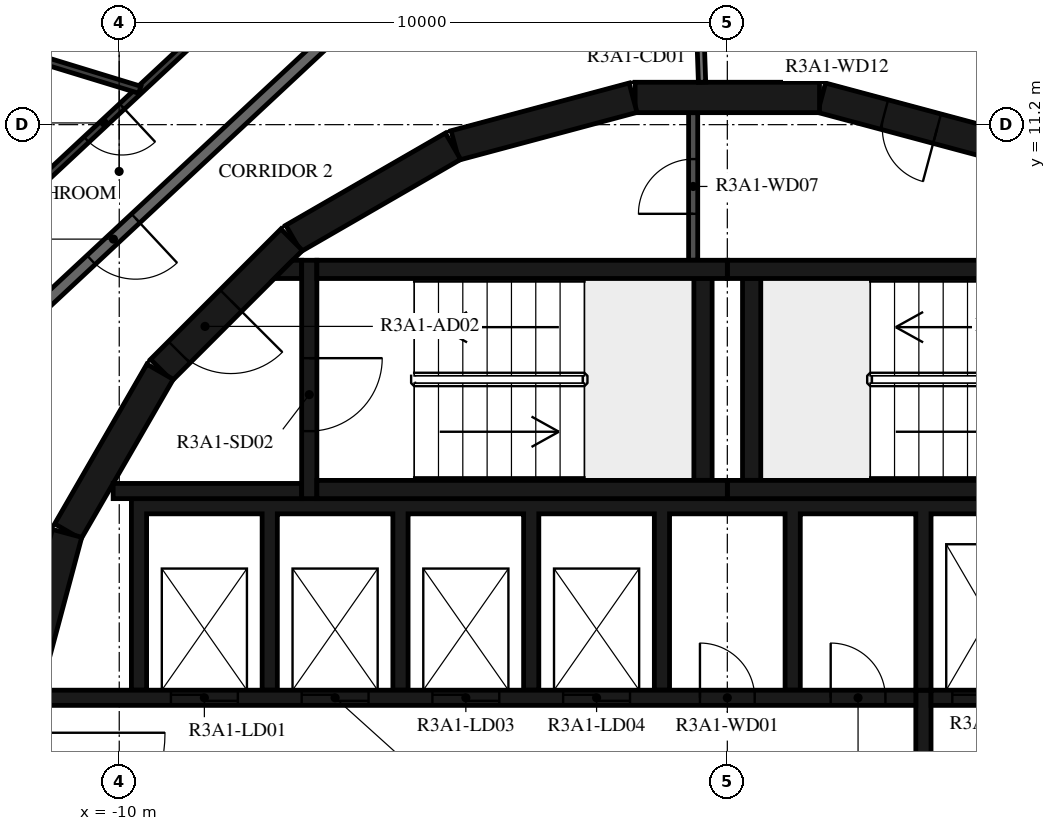
"""IFC4 building model, lengths in metres.
Left out: names, types, materials, properties, quantities, classifications, styles, units other than length and angle.
Written with IfcOpenShell. Run it as: python <this file> out.ifc"""

import sys

from ifc_helpers import new_model, si_unit, direction, frame, frame_2d, origin, place, context, subcontext, project, spatial, polyline, rectangle, outline, extrude, element, fill, save


model = new_model("IFC4")
c1 = context("Model", 3, precision=1e-05, world=origin(), true_north=direction((0.0, 1.0)))
c2 = subcontext(c1, "Body", "Model", "MODEL_VIEW")
j1 = project(units=[si_unit("LENGTHUNIT", "METRE"), si_unit("PLANEANGLEUNIT", "RADIAN")], contexts=[c1])
p1 = place(None, origin())
s1 = spatial("IfcSite", under=j1, at=p1, CompositionType="ELEMENT")
p2 = place(p1, origin())
s2 = spatial("IfcBuilding", under=s1, at=p2, CompositionType="ELEMENT")
p3 = place(p2, frame((0.0, 0.0, 116.9)))
s3 = spatial("IfcBuildingStorey", under=s2, at=p3, CompositionType="ELEMENT", Elevation=116.9)
p4 = place(p3, frame((4.479, 10.858, 0.0), z_axis=(0.0, 0.0, 1.0), x_axis=(-0.965948410781, 0.258734743916, 0.0)))
e1 = element("IfcWall", 1, at=p4, inside=s3, PredefinedType="SHEAR", context=c2, shape_type="SweptSolid", body=[
    extrude(rectangle(XDim=3.033, YDim=0.5, at=frame_2d((1.516, 0.0))), origin(), (0.0, 0.0, 1.0), 3.12),
])
p5 = place(p4, frame((1.066, 0.0, 0.0)))
e2 = element("IfcOpeningElement", 2, at=p5, cuts=e1, PredefinedType="OPENING", context=c2, shape_type="SweptSolid", body=[
    extrude(rectangle(XDim=0.9, YDim=2.1, at=frame_2d((0.45, 1.05))), frame((0.0, 0.26, 0.0), z_axis=(0.0, -1.0, 0.0), x_axis=(1.0, 0.0, 0.0)), (0.0, 0.0, 1.0), 0.52),
])
for number, where, z_axis, x_axis in (
    (3, (1.516, 11.647, 0.0), (0.0, 0.0, 1.0), (-1.0, 0.0, 0.0)),
    (4, (-1.55, 11.643, 0.0), (0.0, 0.0, 1.0), (-0.966, -0.259, 0.0)),
    (5, (-4.51, 10.845, 0.0), (0.0, 0.0, 1.0), (-0.866, -0.5, 0.0)),
):
    element("IfcWall", number, at=place(p3, frame(where, z_axis=z_axis, x_axis=x_axis)), inside=s3, PredefinedType="SHEAR", context=c2, shape_type="SweptSolid", body=[
        extrude(rectangle(XDim=3.033, YDim=0.5, at=frame_2d((1.516, 0.0))), origin(), (0.0, 0.0, 1.0), 3.12),
    ])
p6 = place(p3, frame((-7.164, 9.308, 0.0), z_axis=(0.0, 0.0, 1.0), x_axis=(-0.707106781187, -0.707106781187, 0.0)))
e6 = element("IfcWall", 6, at=p6, inside=s3, PredefinedType="SHEAR", context=c2, shape_type="SweptSolid", body=[
    extrude(rectangle(XDim=3.032, YDim=0.5, at=frame_2d((1.516, 0.0))), origin(), (0.0, 0.0, 1.0), 3.12),
])
p7 = place(p6, frame((1.416, 0.0, 0.0)))
e7 = element("IfcOpeningElement", 7, at=p7, cuts=e6, PredefinedType="OPENING", context=c2, shape_type="SweptSolid", body=[
    extrude(rectangle(XDim=1.2, YDim=2.1, at=frame_2d((0.6, 1.05))), frame((0.0, 0.26, 0.0), z_axis=(0.0, -1.0, 0.0), x_axis=(1.0, 0.0, 0.0)), (0.0, 0.0, 1.0), 0.52),
])
for number, where, z_axis, x_axis in (
    (8, (-9.329, 7.137, 0.0), (0.0, 0.0, 1.0), (-0.5, -0.866, 0.0)),
    (9, (-10.858, 4.479, 0.0), (0.0, 0.0, 1.0), (-0.259, -0.966, 0.0)),
):
    element("IfcWall", number, at=place(p3, frame(where, z_axis=z_axis, x_axis=x_axis)), inside=s3, PredefinedType="SHEAR", context=c2, shape_type="SweptSolid", body=[
        extrude(rectangle(XDim=3.033, YDim=0.5, at=frame_2d((1.516, 0.0))), origin(), (0.0, 0.0, 1.0), 3.12),
    ])
for number, where, z_axis, x_axis in (
    (10, (0.0, 5.2, 0.0), (0.0, 0.0, 1.0), (1.0, 0.0, 0.0)),
    (11, (0.0, 8.82, 0.0), (0.0, 0.0, 1.0), (1.0, 0.0, 0.0)),
):
    element("IfcWall", number, at=place(p3, frame(where, z_axis=z_axis, x_axis=x_axis)), inside=s3, PredefinedType="SHEAR", context=c2, shape_type="SweptSolid", body=[
        extrude(rectangle(XDim=6.75, YDim=0.3, at=frame_2d((3.375, 0.0))), origin(), (0.0, 0.0, 1.0), 3.12),
    ])
p8 = place(p3, frame((0.4, 5.35, 0.0), z_axis=(0.0, 0.0, 1.0), x_axis=(0.0, 1.0, 0.0)))
e12 = element("IfcWall", 12, at=p8, inside=s3, PredefinedType="SHEAR", context=c2, shape_type="SweptSolid", body=[
    extrude(rectangle(XDim=3.32, YDim=0.3, at=frame_2d((1.66, 0.0))), origin(), (0.0, 0.0, 1.0), 3.12),
])
for number, where, z_axis, x_axis in (
    (13, (-6.75, 5.2, 0.0), (0.0, 0.0, 1.0), (1.0, 0.0, 0.0)),
    (14, (-6.75, 8.82, 0.0), (0.0, 0.0, 1.0), (1.0, 0.0, 0.0)),
):
    element("IfcWall", number, at=place(p3, frame(where, z_axis=z_axis, x_axis=x_axis)), inside=s3, PredefinedType="SHEAR", context=c2, shape_type="SweptSolid", body=[
        extrude(rectangle(XDim=6.75, YDim=0.3, at=frame_2d((3.375, 0.0))), origin(), (0.0, 0.0, 1.0), 3.12),
    ])
p9 = place(p3, frame((-0.4, 5.35, 0.0), z_axis=(0.0, 0.0, 1.0), x_axis=(0.0, 1.0, 0.0)))
e15 = element("IfcWall", 15, at=p9, inside=s3, PredefinedType="SHEAR", context=c2, shape_type="SweptSolid", body=[
    extrude(rectangle(XDim=3.32, YDim=0.3, at=frame_2d((1.66, 0.0))), origin(), (0.0, 0.0, 1.0), 3.12),
])
p10 = place(p3, frame((-6.875, 8.97, 0.0), z_axis=(0.0, 0.0, 1.0), x_axis=(0.0, -1.0, 0.0)))
e16 = element("IfcWall", 16, at=p10, inside=s3, PredefinedType="SHEAR", context=c2, shape_type="SweptSolid", body=[
    extrude(rectangle(XDim=3.92, YDim=0.25, at=frame_2d((1.96, 0.0))), origin(), (0.0, 0.0, 1.0), 3.12),
])
p11 = place(p10, frame((1.61, 0.0, 0.0)))
e17 = element("IfcOpeningElement", 17, at=p11, cuts=e16, PredefinedType="OPENING", context=c2, shape_type="SweptSolid", body=[
    extrude(rectangle(XDim=1.2, YDim=2.1, at=frame_2d((0.6, 1.05))), frame((0.0, 0.135, 0.0), z_axis=(0.0, -1.0, 0.0), x_axis=(1.0, 0.0, 0.0)), (0.0, 0.0, 1.0), 0.27),
])
p12 = place(p3, frame((-7.0, 5.175, 0.0), z_axis=(0.0, 0.0, 1.0), x_axis=(-1.0, 0.0, 0.0)))
e18 = element("IfcWall", 18, at=p12, inside=s3, PredefinedType="SHEAR", context=c2, shape_type="SweptSolid", body=[
    extrude(rectangle(XDim=3.1, YDim=0.25, at=frame_2d((1.55, 0.0))), origin(), (0.0, 0.0, 1.0), 3.12),
])
p13 = place(p3, origin())
e19 = element("IfcWall", 19, at=p13, inside=s3, PredefinedType="SHEAR", context=c2, shape_type="SweptSolid", body=[
    extrude(outline(polyline([(-7.148, 8.97), (-7.0, 8.97), (-7.0, 8.67), (-7.448, 8.67), (-7.148, 8.97)])), origin(), (0.0, 0.0, 1.0), 3.12),
])
p14 = place(p3, origin())
e20 = element("IfcWall", 20, at=p14, inside=s3, PredefinedType="SHEAR", context=c2, shape_type="SweptSolid", body=[
    extrude(outline(polyline([(-9.55, 4.8), (-7.65, 4.8), (-7.65, 1.9), (-7.4, 1.9), (-7.4, 4.8), (-5.5, 4.8), (-5.5, 1.9), (-5.25, 1.9), (-5.25, 4.8), (-3.35, 4.8), (-3.35, 1.9), (-3.1, 1.9), (-3.1, 4.8), (-1.2, 4.8), (-1.2, 1.9), (-0.95, 1.9), (-0.95, 4.8), (0.95, 4.8), (0.95, 1.9), (1.2, 1.9), (1.2, 4.8), (3.1, 4.8), (3.1, 1.9), (3.35, 1.9), (3.35, 4.8), (5.25, 4.8), (5.25, 1.9), (5.5, 1.9), (5.5, 4.8), (7.4, 4.8), (7.4, 1.9), (7.65, 1.9), (7.65, 4.8), (9.55, 4.8), (9.55, 1.9), (9.8, 1.9), (9.8, 4.8), (9.8, 5.05), (-9.8, 5.05), (-9.8, 4.8), (-9.8, 1.9), (-9.55, 1.9), (-9.55, 4.8)])), origin(), (0.0, 0.0, 1.0), 3.12),
])
p15 = place(p3, frame((-11.28, 1.775, 0.0), z_axis=(0.0, 0.0, 1.0), x_axis=(1.0, 0.0, 0.0)))
e21 = element("IfcWall", 21, at=p15, inside=s3, PredefinedType="SHEAR", context=c2, shape_type="SweptSolid", body=[
    extrude(rectangle(XDim=14.38, YDim=0.25, at=frame_2d((7.19, 0.0))), origin(), (0.0, 0.0, 1.0), 3.12),
])
p16 = place(p15, frame((2.13, 0.0, 0.0)))
e22 = element("IfcOpeningElement", 22, at=p16, cuts=e21, PredefinedType="OPENING", context=c2, shape_type="SweptSolid", body=[
    extrude(rectangle(XDim=1.1, YDim=2.1, at=frame_2d((0.55, 1.05))), frame((0.0, 0.135, 0.0), z_axis=(0.0, -1.0, 0.0), x_axis=(1.0, 0.0, 0.0)), (0.0, 0.0, 1.0), 0.27),
])
p17 = place(p15, frame((4.28, 0.0, 0.0)))
e23 = element("IfcOpeningElement", 23, at=p17, cuts=e21, PredefinedType="OPENING", context=c2, shape_type="SweptSolid", body=[
    extrude(rectangle(XDim=1.1, YDim=2.1, at=frame_2d((0.55, 1.05))), frame((0.0, 0.135, 0.0), z_axis=(0.0, -1.0, 0.0), x_axis=(1.0, 0.0, 0.0)), (0.0, 0.0, 1.0), 0.27),
])
p18 = place(p15, frame((6.43, 0.0, 0.0)))
e24 = element("IfcOpeningElement", 24, at=p18, cuts=e21, PredefinedType="OPENING", context=c2, shape_type="SweptSolid", body=[
    extrude(rectangle(XDim=1.1, YDim=2.1, at=frame_2d((0.55, 1.05))), frame((0.0, 0.135, 0.0), z_axis=(0.0, -1.0, 0.0), x_axis=(1.0, 0.0, 0.0)), (0.0, 0.0, 1.0), 0.27),
])
p19 = place(p15, frame((8.58, 0.0, 0.0)))
e25 = element("IfcOpeningElement", 25, at=p19, cuts=e21, PredefinedType="OPENING", context=c2, shape_type="SweptSolid", body=[
    extrude(rectangle(XDim=1.1, YDim=2.1, at=frame_2d((0.55, 1.05))), frame((0.0, 0.135, 0.0), z_axis=(0.0, -1.0, 0.0), x_axis=(1.0, 0.0, 0.0)), (0.0, 0.0, 1.0), 0.27),
])
p20 = place(p15, frame((10.83, 0.0, 0.0)))
e26 = element("IfcOpeningElement", 26, at=p20, cuts=e21, PredefinedType="OPENING", context=c2, shape_type="SweptSolid", body=[
    extrude(rectangle(XDim=0.9, YDim=2.1, at=frame_2d((0.45, 1.05))), frame((0.0, 0.135, 0.0), z_axis=(0.0, -1.0, 0.0), x_axis=(1.0, 0.0, 0.0)), (0.0, 0.0, 1.0), 0.27),
])
p21 = place(p15, frame((12.98, 0.0, 0.0)))
e27 = element("IfcOpeningElement", 27, at=p21, cuts=e21, PredefinedType="OPENING", context=c2, shape_type="SweptSolid", body=[
    extrude(rectangle(XDim=0.9, YDim=2.1, at=frame_2d((0.45, 1.05))), frame((0.0, 0.135, 0.0), z_axis=(0.0, -1.0, 0.0), x_axis=(1.0, 0.0, 0.0)), (0.0, 0.0, 1.0), 0.27),
])
p22 = place(p3, frame((3.35, 1.775, 0.0), z_axis=(0.0, 0.0, 1.0), x_axis=(1.0, 0.0, 0.0)))
e28 = element("IfcWall", 28, at=p22, inside=s3, PredefinedType="SHEAR", context=c2, shape_type="SweptSolid", body=[
    extrude(rectangle(XDim=7.93, YDim=0.25, at=frame_2d((3.965, 0.0))), origin(), (0.0, 0.0, 1.0), 3.12),
])
p23 = place(p22, frame((0.35, 0.0, 0.0)))
e29 = element("IfcOpeningElement", 29, at=p23, cuts=e28, PredefinedType="OPENING", context=c2, shape_type="SweptSolid", body=[
    extrude(rectangle(XDim=1.2, YDim=2.4, at=frame_2d((0.6, 1.2))), frame((0.0, 0.135, 0.0), z_axis=(0.0, -1.0, 0.0), x_axis=(1.0, 0.0, 0.0)), (0.0, 0.0, 1.0), 0.27),
])
p24 = place(p22, frame((2.5, 0.0, 0.0)))
e30 = element("IfcOpeningElement", 30, at=p24, cuts=e28, PredefinedType="OPENING", context=c2, shape_type="SweptSolid", body=[
    extrude(rectangle(XDim=1.2, YDim=2.4, at=frame_2d((0.6, 1.2))), frame((0.0, 0.135, 0.0), z_axis=(0.0, -1.0, 0.0), x_axis=(1.0, 0.0, 0.0)), (0.0, 0.0, 1.0), 0.27),
])
p25 = place(p22, frame((4.8, 0.0, 0.0)))
e31 = element("IfcOpeningElement", 31, at=p25, cuts=e28, PredefinedType="OPENING", context=c2, shape_type="SweptSolid", body=[
    extrude(rectangle(XDim=0.9, YDim=2.1, at=frame_2d((0.45, 1.05))), frame((0.0, 0.135, 0.0), z_axis=(0.0, -1.0, 0.0), x_axis=(1.0, 0.0, 0.0)), (0.0, 0.0, 1.0), 0.27),
])
p26 = place(p3, frame((3.225, -1.9, 0.0), z_axis=(0.0, 0.0, 1.0), x_axis=(0.0, 1.0, 0.0)))
e32 = element("IfcWall", 32, at=p26, inside=s3, PredefinedType="SHEAR", context=c2, shape_type="SweptSolid", body=[
    extrude(rectangle(XDim=3.8, YDim=0.25, at=frame_2d((1.9, 0.0))), origin(), (0.0, 0.0, 1.0), 3.12),
])
p27 = place(p3, frame((-0.562, 8.97, 0.0), z_axis=(0.0, 0.0, 1.0), x_axis=(0.0, 1.0, 0.0)))
e33 = element("IfcWall", 33, at=p27, inside=s3, PredefinedType="PARTITIONING", context=c2, shape_type="SweptSolid", body=[
    extrude(rectangle(XDim=2.427, YDim=0.15, at=frame_2d((1.214, 0.0))), origin(), (0.0, 0.0, 1.0), 3.12),
])
p28 = place(p27, frame((0.764, 0.0, 0.0)))
e34 = element("IfcOpeningElement", 34, at=p28, cuts=e33, PredefinedType="OPENING", context=c2, shape_type="SweptSolid", body=[
    extrude(rectangle(XDim=0.9, YDim=2.1, at=frame_2d((0.45, 1.05))), frame((0.0, 0.085, 0.0), z_axis=(0.0, -1.0, 0.0), x_axis=(1.0, 0.0, 0.0)), (0.0, 0.0, 1.0), 0.17),
])
p29 = place(p3, frame((-0.487, 13.948, 0.0), z_axis=(0.0, 0.0, 1.0), x_axis=(0.034859752231, -0.999392214135, 0.0)))
e35 = element("IfcWall", 35, at=p29, inside=s3, PredefinedType="PARTITIONING", context=c2, shape_type="SweptSolid", body=[
    extrude(rectangle(XDim=2.052, YDim=0.12, at=frame_2d((1.026, 0.0))), origin(), (0.0, 0.0, 1.0), 3.12),
])
p30 = place(p29, frame((0.125, 0.0, 0.0)))
e36 = element("IfcOpeningElement", 36, at=p30, cuts=e35, PredefinedType="OPENING", context=c2, shape_type="SweptSolid", body=[
    extrude(rectangle(XDim=1.2, YDim=2.1, at=frame_2d((0.6, 1.05))), frame((0.0, 0.07, 0.0), z_axis=(0.0, -1.0, 0.0), x_axis=(1.0, 0.0, 0.0)), (0.0, 0.0, 1.0), 0.14),
])
p31 = place(p3, frame((7.516, 12.028, 0.0), z_axis=(0.0, 0.0, 1.0), x_axis=(-0.956306642771, 0.292365533182, 0.0)))
e37 = element("IfcWall", 37, at=p31, inside=s3, PredefinedType="STANDARD", context=c2, shape_type="SweptSolid", body=[
    extrude(rectangle(XDim=7.342, YDim=0.2, at=frame_2d((3.671, 0.0))), origin(), (0.0, 0.0, 1.0), 3.12),
])
p32 = place(p3, frame((-6.659, 12.523, 0.0), z_axis=(0.0, 0.0, 1.0), x_axis=(-0.731350455479, -0.682001841105, 0.0)))
e38 = element("IfcWall", 38, at=p32, inside=s3, PredefinedType="STANDARD", context=c2, shape_type="SweptSolid", body=[
    extrude(rectangle(XDim=7.342, YDim=0.2, at=frame_2d((3.671, 0.0))), origin(), (0.0, 0.0, 1.0), 3.12),
])
p33 = place(p32, frame((4.2, 0.0, 0.0)))
e39 = element("IfcOpeningElement", 39, at=p33, cuts=e38, PredefinedType="OPENING", context=c2, shape_type="SweptSolid", body=[
    extrude(rectangle(XDim=1.0, YDim=2.1, at=frame_2d((0.5, 1.05))), frame((0.0, 0.11, 0.0), z_axis=(0.0, -1.0, 0.0), x_axis=(1.0, 0.0, 0.0)), (0.0, 0.0, 1.0), 0.22),
])
p34 = place(p3, frame((-1.539, 24.071, 0.0), z_axis=(0.0, 0.0, 1.0), x_axis=(0.68200220595, -0.731350115252, 0.0)))
e40 = element("IfcWall", 40, at=p34, inside=s3, PredefinedType="PARTITIONING", context=c2, shape_type="SweptSolid", body=[
    extrude(rectangle(XDim=17.316, YDim=0.12, at=frame_2d((8.658, 0.0))), origin(), (0.0, 0.0, 1.0), 3.12),
])
p35 = place(p34, frame((3.323, 0.0, 0.0)))
e41 = element("IfcOpeningElement", 41, at=p35, cuts=e40, PredefinedType="OPENING", context=c2, shape_type="SweptSolid", body=[
    extrude(rectangle(XDim=0.9, YDim=2.1, at=frame_2d((0.45, 1.05))), frame((0.0, 0.07, 0.0), z_axis=(0.0, -1.0, 0.0), x_axis=(1.0, 0.0, 0.0)), (0.0, 0.0, 1.0), 0.14),
])
p36 = place(p34, frame((1.417, 0.0, 0.0)))
e42 = element("IfcOpeningElement", 42, at=p36, cuts=e40, PredefinedType="OPENING", context=c2, shape_type="SweptSolid", body=[
    extrude(rectangle(XDim=0.9, YDim=2.1, at=frame_2d((0.45, 1.05))), frame((0.0, 0.07, 0.0), z_axis=(0.0, -1.0, 0.0), x_axis=(1.0, 0.0, 0.0)), (0.0, 0.0, 1.0), 0.14),
])
p37 = place(p3, frame((-7.388, 13.894, 0.0), z_axis=(0.0, 0.0, 1.0), x_axis=(-0.731357186721, -0.681994622729, 0.0)))
e43 = element("IfcWall", 43, at=p37, inside=s3, PredefinedType="PARTITIONING", context=c2, shape_type="SweptSolid", body=[
    extrude(rectangle(XDim=8.146, YDim=0.12, at=frame_2d((4.073, 0.0))), origin(), (0.0, 0.0, 1.0), 3.12),
])
p38 = place(p37, frame((3.509, 0.0, 0.0)))
e44 = element("IfcOpeningElement", 44, at=p38, cuts=e43, PredefinedType="OPENING", context=c2, shape_type="SweptSolid", body=[
    extrude(rectangle(XDim=0.8, YDim=2.1, at=frame_2d((0.4, 1.05))), frame((0.0, 0.07, 0.0), z_axis=(0.0, -1.0, 0.0), x_axis=(1.0, 0.0, 0.0)), (0.0, 0.0, 1.0), 0.14),
])
p39 = place(p3, frame((-9.169, 22.31, 0.0), z_axis=(0.0, 0.0, 1.0), x_axis=(-0.29236145486, -0.956307889601, 0.0)))
e45 = element("IfcWall", 45, at=p39, inside=s3, PredefinedType="PARTITIONING", context=c2, shape_type="SweptSolid", body=[
    extrude(rectangle(XDim=17.316, YDim=0.12, at=frame_2d((8.658, 0.0))), origin(), (0.0, 0.0, 1.0), 3.12),
])
p40 = place(p39, frame((3.683, 0.0, 0.0)))
e46 = element("IfcOpeningElement", 46, at=p40, cuts=e45, PredefinedType="OPENING", context=c2, shape_type="SweptSolid", body=[
    extrude(rectangle(XDim=0.9, YDim=2.1, at=frame_2d((0.45, 1.05))), frame((0.0, 0.07, 0.0), z_axis=(0.0, -1.0, 0.0), x_axis=(1.0, 0.0, 0.0)), (0.0, 0.0, 1.0), 0.14),
])
p41 = place(p3, frame((-12.157, 12.537, 0.0), z_axis=(0.0, 0.0, 1.0), x_axis=(0.956293441844, -0.292408708979, 0.0)))
e47 = element("IfcWall", 47, at=p41, inside=s3, PredefinedType="PARTITIONING", context=c2, shape_type="SweptSolid", body=[
    extrude(rectangle(XDim=2.609, YDim=0.12, at=frame_2d((1.305, 0.0))), origin(), (0.0, 0.0, 1.0), 3.12),
])
p42 = place(p11, origin())
e48 = element("IfcDoor", 48, at=p42, inside=s3, OperationType="SINGLE_SWING_LEFT", PredefinedType="DOOR", context=c2, shape_type="SweptSolid", body=[
    extrude(rectangle(XDim=1.2, YDim=2.1, at=frame_2d((0.6, 1.05))), frame((0.0, 0.025, 0.0), z_axis=(0.0, -1.0, 0.0), x_axis=(1.0, 0.0, 0.0)), (0.0, 0.0, 1.0), 0.05),
])
fill(e17, e48)
p43 = place(p7, origin())
e49 = element("IfcDoor", 49, at=p43, inside=s3, OperationType="SINGLE_SWING_RIGHT", PredefinedType="DOOR", context=c2, shape_type="SweptSolid", body=[
    extrude(rectangle(XDim=1.2, YDim=2.1, at=frame_2d((0.6, 1.05))), frame((0.0, 0.025, 0.0), z_axis=(0.0, -1.0, 0.0), x_axis=(1.0, 0.0, 0.0)), (0.0, 0.0, 1.0), 0.05),
])
fill(e7, e49)
p44 = place(p16, origin())
e50 = element("IfcDoor", 50, at=p44, inside=s3, OperationType="DOUBLE_DOOR_SLIDING", PredefinedType="DOOR", context=c2, shape_type="SweptSolid", body=[
    extrude(rectangle(XDim=1.1, YDim=2.1, at=frame_2d((0.55, 1.05))), frame((0.0, 0.025, 0.0), z_axis=(0.0, -1.0, 0.0), x_axis=(1.0, 0.0, 0.0)), (0.0, 0.0, 1.0), 0.05),
])
fill(e22, e50)
p45 = place(p17, origin())
e51 = element("IfcDoor", 51, at=p45, inside=s3, OperationType="DOUBLE_DOOR_SLIDING", PredefinedType="DOOR", context=c2, shape_type="SweptSolid", body=[
    extrude(rectangle(XDim=1.1, YDim=2.1, at=frame_2d((0.55, 1.05))), frame((0.0, 0.025, 0.0), z_axis=(0.0, -1.0, 0.0), x_axis=(1.0, 0.0, 0.0)), (0.0, 0.0, 1.0), 0.05),
])
fill(e23, e51)
p46 = place(p18, origin())
e52 = element("IfcDoor", 52, at=p46, inside=s3, OperationType="DOUBLE_DOOR_SLIDING", PredefinedType="DOOR", context=c2, shape_type="SweptSolid", body=[
    extrude(rectangle(XDim=1.1, YDim=2.1, at=frame_2d((0.55, 1.05))), frame((0.0, 0.025, 0.0), z_axis=(0.0, -1.0, 0.0), x_axis=(1.0, 0.0, 0.0)), (0.0, 0.0, 1.0), 0.05),
])
fill(e24, e52)
p47 = place(p19, origin())
e53 = element("IfcDoor", 53, at=p47, inside=s3, OperationType="DOUBLE_DOOR_SLIDING", PredefinedType="DOOR", context=c2, shape_type="SweptSolid", body=[
    extrude(rectangle(XDim=1.1, YDim=2.1, at=frame_2d((0.55, 1.05))), frame((0.0, 0.025, 0.0), z_axis=(0.0, -1.0, 0.0), x_axis=(1.0, 0.0, 0.0)), (0.0, 0.0, 1.0), 0.05),
])
fill(e25, e53)
p48 = place(p23, origin())
e54 = element("IfcDoor", 54, at=p48, inside=s3, OperationType="DOUBLE_DOOR_SLIDING", PredefinedType="DOOR", context=c2, shape_type="SweptSolid", body=[
    extrude(rectangle(XDim=1.2, YDim=2.4, at=frame_2d((0.6, 1.2))), frame((0.0, 0.025, 0.0), z_axis=(0.0, -1.0, 0.0), x_axis=(1.0, 0.0, 0.0)), (0.0, 0.0, 1.0), 0.05),
])
fill(e29, e54)
p49 = place(p20, origin())
e55 = element("IfcDoor", 55, at=p49, inside=s3, OperationType="SINGLE_SWING_RIGHT", PredefinedType="DOOR", context=c2, shape_type="SweptSolid", body=[
    extrude(rectangle(XDim=0.9, YDim=2.1, at=frame_2d((0.45, 1.05))), frame((0.0, 0.025, 0.0), z_axis=(0.0, -1.0, 0.0), x_axis=(1.0, 0.0, 0.0)), (0.0, 0.0, 1.0), 0.05),
])
fill(e26, e55)
p50 = place(p21, origin())
e56 = element("IfcDoor", 56, at=p50, inside=s3, OperationType="SINGLE_SWING_LEFT", PredefinedType="DOOR", context=c2, shape_type="SweptSolid", body=[
    extrude(rectangle(XDim=0.9, YDim=2.1, at=frame_2d((0.45, 1.05))), frame((0.0, 0.025, 0.0), z_axis=(0.0, -1.0, 0.0), x_axis=(1.0, 0.0, 0.0)), (0.0, 0.0, 1.0), 0.05),
])
fill(e27, e56)
p51 = place(p28, origin())
e57 = element("IfcDoor", 57, at=p51, inside=s3, OperationType="SINGLE_SWING_RIGHT", PredefinedType="DOOR", context=c2, shape_type="SweptSolid", body=[
    extrude(rectangle(XDim=0.9, YDim=2.1, at=frame_2d((0.45, 1.05))), frame((0.0, 0.025, 0.0), z_axis=(0.0, -1.0, 0.0), x_axis=(1.0, 0.0, 0.0)), (0.0, 0.0, 1.0), 0.05),
])
fill(e34, e57)
p52 = place(p5, origin())
e58 = element("IfcDoor", 58, at=p52, inside=s3, OperationType="SINGLE_SWING_LEFT", PredefinedType="DOOR", context=c2, shape_type="SweptSolid", body=[
    extrude(rectangle(XDim=0.9, YDim=2.1, at=frame_2d((0.45, 1.05))), frame((0.0, 0.025, 0.0), z_axis=(0.0, -1.0, 0.0), x_axis=(1.0, 0.0, 0.0)), (0.0, 0.0, 1.0), 0.05),
])
fill(e2, e58)
p53 = place(p33, origin())
e59 = element("IfcDoor", 59, at=p53, inside=s3, OperationType="SINGLE_SWING_LEFT", PredefinedType="DOOR", context=c2, shape_type="SweptSolid", body=[
    extrude(rectangle(XDim=1.0, YDim=2.1, at=frame_2d((0.5, 1.05))), frame((0.0, 0.025, 0.0), z_axis=(0.0, -1.0, 0.0), x_axis=(1.0, 0.0, 0.0)), (0.0, 0.0, 1.0), 0.05),
])
fill(e39, e59)
p54 = place(p38, origin())
e60 = element("IfcDoor", 60, at=p54, inside=s3, OperationType="SINGLE_SWING_LEFT", PredefinedType="DOOR", context=c2, shape_type="SweptSolid", body=[
    extrude(rectangle(XDim=0.8, YDim=2.1, at=frame_2d((0.4, 1.05))), frame((0.0, 0.025, 0.0), z_axis=(0.0, -1.0, 0.0), x_axis=(1.0, 0.0, 0.0)), (0.0, 0.0, 1.0), 0.05),
])
fill(e44, e60)
save(model, sys.argv[1])
